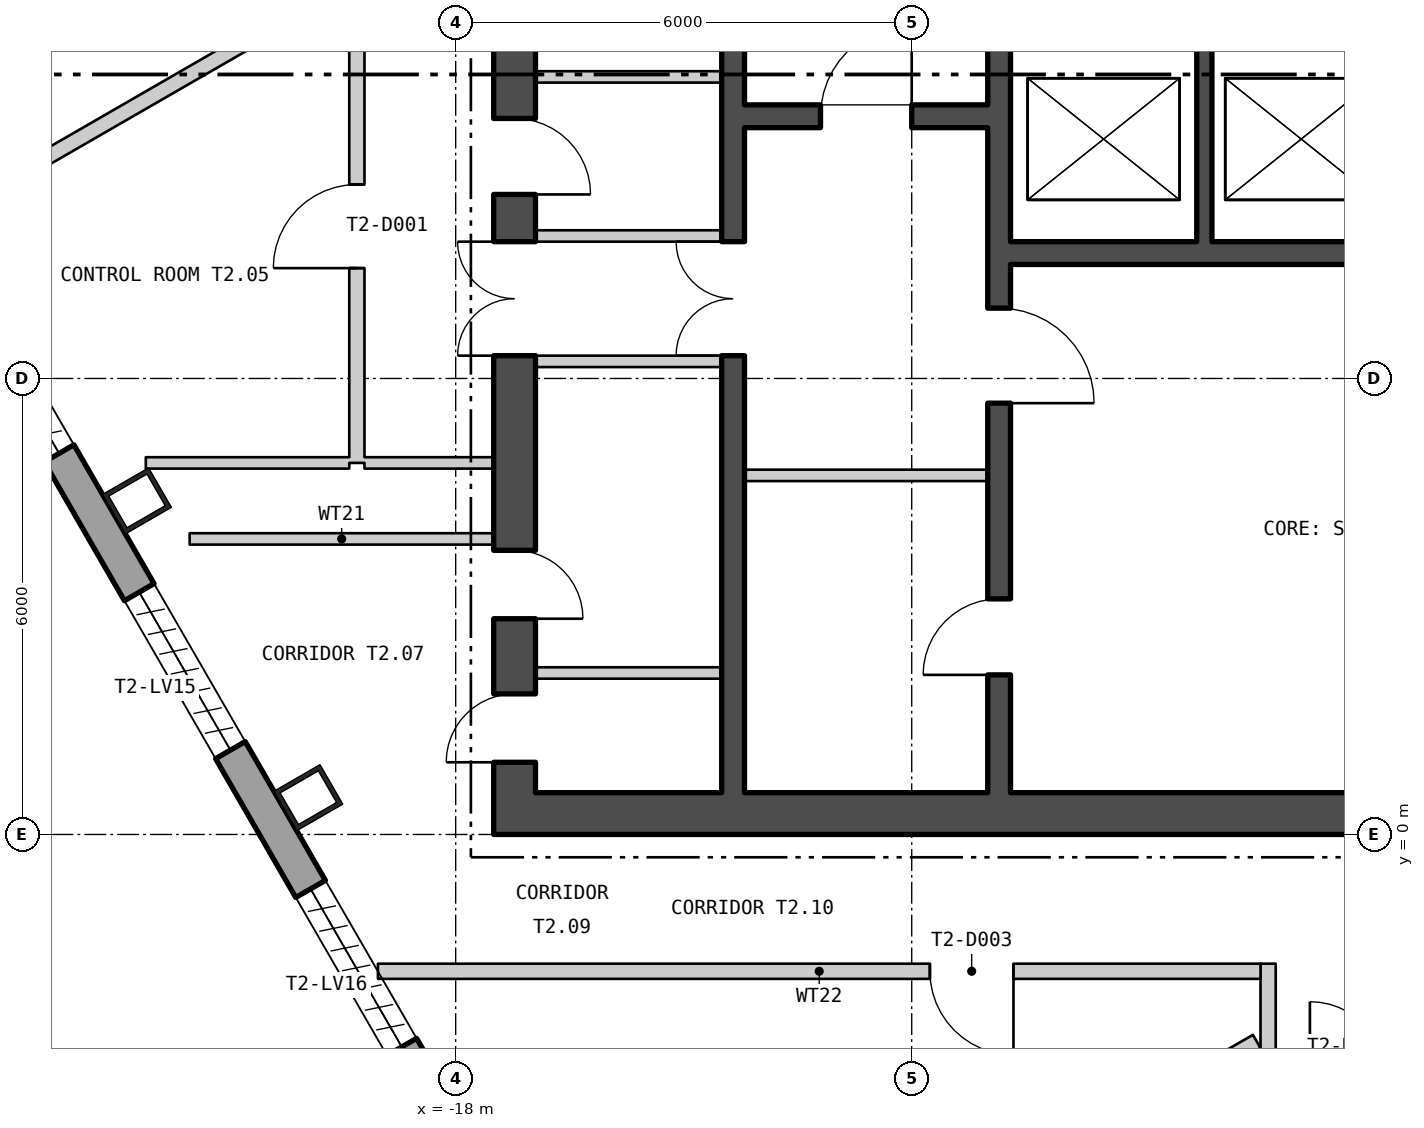
"""IFC4 building model, lengths in metres.
Left out: names, types, materials, properties, quantities, classifications, styles, units other than length and angle.
Written with IfcOpenShell. Run it as: python <this file> out.ifc"""

import sys

from ifc_helpers import new_model, si_unit, direction, frame, frame_2d, origin, origin_2d, place, context, subcontext, project, spatial, polyline, rectangle, hollow_rectangle, outline, extrude, element, fill, save


model = new_model("IFC4")
c1 = context("Model", 3, precision=1e-05, world=origin(), true_north=direction((0.0, 1.0)))
c2 = subcontext(c1, "Body", "Model", "MODEL_VIEW")
j1 = project(units=[si_unit("LENGTHUNIT", "METRE"), si_unit("PLANEANGLEUNIT", "RADIAN")], contexts=[c1])
p1 = place(None, origin())
s1 = spatial("IfcSite", under=j1, at=p1, CompositionType="ELEMENT")
p2 = place(p1, origin())
s2 = spatial("IfcBuilding", under=s1, at=p2, CompositionType="ELEMENT")
p3 = place(p2, frame((0.0, 0.0, 133.8)))
s3 = spatial("IfcBuildingStorey", under=s2, at=p3, CompositionType="ELEMENT", Elevation=133.8)
for number, where, z_axis, x_axis in (
    (1, (-22.193, 4.389, 0.0), (0.0, 0.0, 1.0), (0.5, -0.866, 0.0)),
    (2, (-19.938, 0.484, 0.0), (0.0, 0.0, 1.0), (0.5, -0.866, 0.0)),
):
    element("IfcColumn", number, at=place(p3, frame(where, z_axis=z_axis, x_axis=x_axis)), inside=s3, PredefinedType="COLUMN", context=c2, shape_type="SweptSolid", body=[
        extrude(hollow_rectangle(XDim=0.6, YDim=0.7, WallThickness=0.06, at=origin_2d()), origin(), (0.0, 0.0, 1.0), 6.0),
    ])
p4 = place(p3, frame((-27.365, 12.198, -0.18), z_axis=(0.0, 0.0, 1.0), x_axis=(0.500000335318, -0.866025210188, 0.0)))
e3 = element("IfcWall", 3, at=p4, inside=s3, PredefinedType="SOLIDWALL", context=c2, shape_type="SweptSolid", body=[
    extrude(outline(polyline([(-0.13, -0.225), (45.88, -0.225), (45.62, 0.225), (0.13, 0.225), (-0.13, -0.225)])), origin(), (0.0, 0.0, 1.0), 6.0),
])
p5 = place(p4, frame((1.425, 0.0, 1.38)))
e4 = element("IfcOpeningElement", 4, at=p5, cuts=e3, PredefinedType="OPENING", context=c2, shape_type="SweptSolid", body=[
    extrude(rectangle(XDim=2.4, YDim=3.6, at=frame_2d((1.2, 1.8))), frame((0.0, 0.235, 0.0), z_axis=(0.0, -1.0, 0.0), x_axis=(1.0, 0.0, 0.0)), (0.0, 0.0, 1.0), 0.47),
])
p6 = place(p4, frame((5.895, 0.0, 1.38)))
e5 = element("IfcOpeningElement", 5, at=p6, cuts=e3, PredefinedType="OPENING", context=c2, shape_type="SweptSolid", body=[
    extrude(rectangle(XDim=2.4, YDim=3.6, at=frame_2d((1.2, 1.8))), frame((0.0, 0.235, 0.0), z_axis=(0.0, -1.0, 0.0), x_axis=(1.0, 0.0, 0.0)), (0.0, 0.0, 1.0), 0.47),
])
p7 = place(p4, frame((10.403, 0.0, 1.38)))
e6 = element("IfcOpeningElement", 6, at=p7, cuts=e3, PredefinedType="OPENING", context=c2, shape_type="SweptSolid", body=[
    extrude(rectangle(XDim=2.4, YDim=3.6, at=frame_2d((1.2, 1.8))), frame((0.0, 0.235, 0.0), z_axis=(0.0, -1.0, 0.0), x_axis=(1.0, 0.0, 0.0)), (0.0, 0.0, 1.0), 0.47),
])
p8 = place(p4, frame((14.912, 0.0, 1.38)))
e7 = element("IfcOpeningElement", 7, at=p8, cuts=e3, PredefinedType="OPENING", context=c2, shape_type="SweptSolid", body=[
    extrude(rectangle(XDim=2.4, YDim=3.6, at=frame_2d((1.2, 1.8))), frame((0.0, 0.235, 0.0), z_axis=(0.0, -1.0, 0.0), x_axis=(1.0, 0.0, 0.0)), (0.0, 0.0, 1.0), 0.47),
])
p9 = place(p4, frame((19.421, 0.0, 1.38)))
e8 = element("IfcOpeningElement", 8, at=p9, cuts=e3, PredefinedType="OPENING", context=c2, shape_type="SweptSolid", body=[
    extrude(rectangle(XDim=2.4, YDim=3.6, at=frame_2d((1.2, 1.8))), frame((0.0, 0.235, 0.0), z_axis=(0.0, -1.0, 0.0), x_axis=(1.0, 0.0, 0.0)), (0.0, 0.0, 1.0), 0.47),
])
p10 = place(p4, frame((23.929, 0.0, 1.38)))
e9 = element("IfcOpeningElement", 9, at=p10, cuts=e3, PredefinedType="OPENING", context=c2, shape_type="SweptSolid", body=[
    extrude(rectangle(XDim=2.4, YDim=3.6, at=frame_2d((1.2, 1.8))), frame((0.0, 0.235, 0.0), z_axis=(0.0, -1.0, 0.0), x_axis=(1.0, 0.0, 0.0)), (0.0, 0.0, 1.0), 0.47),
])
p11 = place(p4, frame((28.438, 0.0, 1.38)))
e10 = element("IfcOpeningElement", 10, at=p11, cuts=e3, PredefinedType="OPENING", context=c2, shape_type="SweptSolid", body=[
    extrude(rectangle(XDim=2.4, YDim=3.6, at=frame_2d((1.2, 1.8))), frame((0.0, 0.235, 0.0), z_axis=(0.0, -1.0, 0.0), x_axis=(1.0, 0.0, 0.0)), (0.0, 0.0, 1.0), 0.47),
])
p12 = place(p4, frame((32.947, 0.0, 1.38)))
e11 = element("IfcOpeningElement", 11, at=p12, cuts=e3, PredefinedType="OPENING", context=c2, shape_type="SweptSolid", body=[
    extrude(rectangle(XDim=2.4, YDim=3.6, at=frame_2d((1.2, 1.8))), frame((0.0, 0.235, 0.0), z_axis=(0.0, -1.0, 0.0), x_axis=(1.0, 0.0, 0.0)), (0.0, 0.0, 1.0), 0.47),
])
p13 = place(p4, frame((37.455, 0.0, 1.38)))
e12 = element("IfcOpeningElement", 12, at=p13, cuts=e3, PredefinedType="OPENING", context=c2, shape_type="SweptSolid", body=[
    extrude(rectangle(XDim=2.4, YDim=3.6, at=frame_2d((1.2, 1.8))), frame((0.0, 0.235, 0.0), z_axis=(0.0, -1.0, 0.0), x_axis=(1.0, 0.0, 0.0)), (0.0, 0.0, 1.0), 0.47),
])
p14 = place(p4, frame((41.925, 0.0, 1.38)))
e13 = element("IfcOpeningElement", 13, at=p14, cuts=e3, PredefinedType="OPENING", context=c2, shape_type="SweptSolid", body=[
    extrude(rectangle(XDim=2.4, YDim=3.6, at=frame_2d((1.2, 1.8))), frame((0.0, 0.235, 0.0), z_axis=(0.0, -1.0, 0.0), x_axis=(1.0, 0.0, 0.0)), (0.0, 0.0, 1.0), 0.47),
])
p15 = place(p3, frame((-17.5, 0.275, 0.0), z_axis=(0.0, 0.0, 1.0), x_axis=(1.0, 0.0, 0.0)))
e14 = element("IfcWall", 14, at=p15, inside=s3, PredefinedType="SHEAR", context=c2, shape_type="SweptSolid", body=[
    extrude(rectangle(XDim=35.0, YDim=0.55, at=frame_2d((17.5, 0.0))), origin(), (0.0, 0.0, 1.0), 5.8),
])
p16 = place(p15, frame((12.0, 0.0, 0.0)))
e15 = element("IfcOpeningElement", 15, at=p16, cuts=e14, PredefinedType="OPENING", context=c2, shape_type="SweptSolid", body=[
    extrude(rectangle(XDim=1.8, YDim=2.4, at=frame_2d((0.9, 1.2))), frame((0.0, 0.285, 0.0), z_axis=(0.0, -1.0, 0.0), x_axis=(1.0, 0.0, 0.0)), (0.0, 0.0, 1.0), 0.57),
])
p17 = place(p15, frame((22.0, 0.0, 0.0)))
e16 = element("IfcOpeningElement", 16, at=p17, cuts=e14, PredefinedType="OPENING", context=c2, shape_type="SweptSolid", body=[
    extrude(rectangle(XDim=1.8, YDim=2.4, at=frame_2d((0.9, 1.2))), frame((0.0, 0.285, 0.0), z_axis=(0.0, -1.0, 0.0), x_axis=(1.0, 0.0, 0.0)), (0.0, 0.0, 1.0), 0.57),
])
p18 = place(p3, frame((-17.225, 0.55, 0.0), z_axis=(0.0, 0.0, 1.0), x_axis=(0.0, 1.0, 0.0)))
e17 = element("IfcWall", 17, at=p18, inside=s3, PredefinedType="SHEAR", context=c2, shape_type="SweptSolid", body=[
    extrude(rectangle(XDim=16.9, YDim=0.55, at=frame_2d((8.45, 0.0))), origin(), (0.0, 0.0, 1.0), 5.8),
])
p19 = place(p18, frame((5.75, 0.0, 0.0)))
e18 = element("IfcOpeningElement", 18, at=p19, cuts=e17, PredefinedType="OPENING", context=c2, shape_type="SweptSolid", body=[
    extrude(rectangle(XDim=1.5, YDim=2.1, at=frame_2d((0.75, 1.05))), frame((0.0, 0.285, 0.0), z_axis=(0.0, -1.0, 0.0), x_axis=(1.0, 0.0, 0.0)), (0.0, 0.0, 1.0), 0.57),
])
p20 = place(p18, frame((0.4, 0.0, 0.0)))
e19 = element("IfcOpeningElement", 19, at=p20, cuts=e17, PredefinedType="OPENING", context=c2, shape_type="SweptSolid", body=[
    extrude(rectangle(XDim=0.9, YDim=2.1, at=frame_2d((0.45, 1.05))), frame((0.0, 0.285, 0.0), z_axis=(0.0, -1.0, 0.0), x_axis=(1.0, 0.0, 0.0)), (0.0, 0.0, 1.0), 0.57),
])
p21 = place(p18, frame((2.289, 0.0, 0.0)))
e20 = element("IfcOpeningElement", 20, at=p21, cuts=e17, PredefinedType="OPENING", context=c2, shape_type="SweptSolid", body=[
    extrude(rectangle(XDim=0.9, YDim=2.1, at=frame_2d((0.45, 1.05))), frame((0.0, 0.285, 0.0), z_axis=(0.0, -1.0, 0.0), x_axis=(1.0, 0.0, 0.0)), (0.0, 0.0, 1.0), 0.57),
])
p22 = place(p18, frame((7.871, 0.0, 0.0)))
e21 = element("IfcOpeningElement", 21, at=p22, cuts=e17, PredefinedType="OPENING", context=c2, shape_type="SweptSolid", body=[
    extrude(rectangle(XDim=1.0, YDim=2.1, at=frame_2d((0.5, 1.05))), frame((0.0, 0.285, 0.0), z_axis=(0.0, -1.0, 0.0), x_axis=(1.0, 0.0, 0.0)), (0.0, 0.0, 1.0), 0.57),
])
p23 = place(p18, frame((12.746, 0.0, 0.0)))
e22 = element("IfcOpeningElement", 22, at=p23, cuts=e17, PredefinedType="OPENING", context=c2, shape_type="SweptSolid", body=[
    extrude(rectangle(XDim=0.9, YDim=2.1, at=frame_2d((0.45, 1.05))), frame((0.0, 0.285, 0.0), z_axis=(0.0, -1.0, 0.0), x_axis=(1.0, 0.0, 0.0)), (0.0, 0.0, 1.0), 0.57),
])
p24 = place(p3, frame((-10.85, 0.55, 0.0), z_axis=(0.0, 0.0, 1.0), x_axis=(0.0, 1.0, 0.0)))
e23 = element("IfcWall", 23, at=p24, inside=s3, PredefinedType="SHEAR", context=c2, shape_type="SweptSolid", body=[
    extrude(rectangle(XDim=16.9, YDim=0.3, at=frame_2d((8.45, 0.0))), origin(), (0.0, 0.0, 1.0), 5.8),
])
p25 = place(p24, frame((5.125, 0.0, 0.0)))
e24 = element("IfcOpeningElement", 24, at=p25, cuts=e23, PredefinedType="OPENING", context=c2, shape_type="SweptSolid", body=[
    extrude(rectangle(XDim=1.25, YDim=2.1, at=frame_2d((0.625, 1.05))), frame((0.0, 0.16, 0.0), z_axis=(0.0, -1.0, 0.0), x_axis=(1.0, 0.0, 0.0)), (0.0, 0.0, 1.0), 0.32),
])
p26 = place(p24, frame((1.55, 0.0, 0.0)))
e25 = element("IfcOpeningElement", 25, at=p26, cuts=e23, PredefinedType="OPENING", context=c2, shape_type="SweptSolid", body=[
    extrude(rectangle(XDim=1.0, YDim=2.1, at=frame_2d((0.5, 1.05))), frame((0.0, 0.16, 0.0), z_axis=(0.0, -1.0, 0.0), x_axis=(1.0, 0.0, 0.0)), (0.0, 0.0, 1.0), 0.32),
])
p27 = place(p3, frame((-14.35, 0.55, 0.0), z_axis=(0.0, 0.0, 1.0), x_axis=(0.0, 1.0, 0.0)))
e26 = element("IfcWall", 26, at=p27, inside=s3, PredefinedType="SHEAR", context=c2, shape_type="SweptSolid", body=[
    extrude(rectangle(XDim=16.9, YDim=0.3, at=frame_2d((8.45, 0.0))), origin(), (0.0, 0.0, 1.0), 5.8),
])
p28 = place(p27, frame((5.75, 0.0, 0.0)))
e27 = element("IfcOpeningElement", 27, at=p28, cuts=e26, PredefinedType="OPENING", context=c2, shape_type="SweptSolid", body=[
    extrude(rectangle(XDim=1.5, YDim=2.1, at=frame_2d((0.75, 1.05))), frame((0.0, 0.16, 0.0), z_axis=(0.0, -1.0, 0.0), x_axis=(1.0, 0.0, 0.0)), (0.0, 0.0, 1.0), 0.32),
])
p29 = place(p3, frame((-14.2, 9.45, 0.0), z_axis=(0.0, 0.0, 1.0), x_axis=(1.0, 0.0, 0.0)))
e28 = element("IfcWall", 28, at=p29, inside=s3, PredefinedType="SHEAR", context=c2, shape_type="SweptSolid", body=[
    extrude(rectangle(XDim=3.2, YDim=0.3, at=frame_2d((1.6, 0.0))), origin(), (0.0, 0.0, 1.0), 5.8),
])
p30 = place(p29, frame((1.0, 0.0, 0.0)))
e29 = element("IfcOpeningElement", 29, at=p30, cuts=e28, PredefinedType="OPENING", context=c2, shape_type="SweptSolid", body=[
    extrude(rectangle(XDim=1.2, YDim=2.1, at=frame_2d((0.6, 1.05))), frame((0.0, 0.16, 0.0), z_axis=(0.0, -1.0, 0.0), x_axis=(1.0, 0.0, 0.0)), (0.0, 0.0, 1.0), 0.32),
])
p31 = place(p3, frame((-10.7, 7.65, 0.0), z_axis=(0.0, 0.0, 1.0), x_axis=(1.0, 0.0, 0.0)))
e30 = element("IfcWall", 30, at=p31, inside=s3, PredefinedType="SHEAR", context=c2, shape_type="SweptSolid", body=[
    extrude(rectangle(XDim=10.3, YDim=0.3, at=frame_2d((5.15, 0.0))), origin(), (0.0, 0.0, 1.0), 5.8),
])
p32 = place(p3, frame((-8.15, 7.8, 0.0), z_axis=(0.0, 0.0, 1.0), x_axis=(0.0, 1.0, 0.0)))
e31 = element("IfcWall", 31, at=p32, inside=s3, PredefinedType="SHEAR", context=c2, shape_type="SweptSolid", body=[
    extrude(rectangle(XDim=2.7, YDim=0.2, at=frame_2d((1.35, 0.0))), origin(), (0.0, 0.0, 1.0), 5.8),
])
p33 = place(p3, frame((-14.2, 4.725, 0.0), z_axis=(0.0, 0.0, 1.0), x_axis=(1.0, 0.0, 0.0)))
e32 = element("IfcWall", 32, at=p33, inside=s3, PredefinedType="PARTITIONING", context=c2, shape_type="SweptSolid", body=[
    extrude(rectangle(XDim=3.2, YDim=0.15, at=frame_2d((1.6, 0.0))), origin(), (0.0, 0.0, 1.0), 5.8),
])
p34 = place(p3, frame((-16.95, 6.225, 0.0), z_axis=(0.0, 0.0, 1.0), x_axis=(1.0, 0.0, 0.0)))
e33 = element("IfcWall", 33, at=p34, inside=s3, PredefinedType="PARTITIONING", context=c2, shape_type="SweptSolid", body=[
    extrude(rectangle(XDim=2.45, YDim=0.15, at=frame_2d((1.225, 0.0))), origin(), (0.0, 0.0, 1.0), 5.8),
])
for number, where, z_axis, x_axis in (
    (34, (-16.95, 7.875, 0.0), (0.0, 0.0, 1.0), (1.0, 0.0, 0.0)),
    (35, (-16.95, 2.125, 0.0), (0.0, 0.0, 1.0), (1.0, 0.0, 0.0)),
):
    element("IfcWall", number, at=place(p3, frame(where, z_axis=z_axis, x_axis=x_axis)), inside=s3, PredefinedType="PARTITIONING", context=c2, shape_type="SweptSolid", body=[
        extrude(rectangle(XDim=2.45, YDim=0.15, at=frame_2d((1.225, 0.0))), origin(), (0.0, 0.0, 1.0), 5.5),
    ])
p35 = place(p3, frame((-16.95, 9.968, 0.0), z_axis=(0.0, 0.0, 1.0), x_axis=(1.0, 0.0, 0.0)))
e36 = element("IfcWall", 36, at=p35, inside=s3, PredefinedType="PARTITIONING", context=c2, shape_type="SweptSolid", body=[
    extrude(rectangle(XDim=2.45, YDim=0.15, at=frame_2d((1.225, 0.0))), origin(), (0.0, 0.0, 1.0), 5.8),
])
p36 = place(p3, frame((-24.361, 8.344, 0.0), z_axis=(0.0, 0.0, 1.0), x_axis=(0.866129793638, 0.499819147866, 0.0)))
e37 = element("IfcWall", 37, at=p36, inside=s3, PredefinedType="PARTITIONING", context=c2, shape_type="SweptSolid", body=[
    extrude(rectangle(XDim=5.67, YDim=0.2, at=frame_2d((2.835, 0.0))), origin(), (0.0, 0.0, 1.0), 5.8),
])
p37 = place(p3, frame((-22.077, 4.889, 0.0), z_axis=(0.0, 0.0, 1.0), x_axis=(1.0, 0.0, 0.0)))
e38 = element("IfcWall", 38, at=p37, inside=s3, PredefinedType="PARTITIONING", context=c2, shape_type="SweptSolid", body=[
    extrude(rectangle(XDim=2.677, YDim=0.15, at=frame_2d((1.339, 0.0))), origin(), (0.0, 0.0, 1.0), 5.8),
])
p38 = place(p3, frame((-21.5, 3.889, 0.0), z_axis=(0.0, 0.0, 1.0), x_axis=(1.0, 0.0, 0.0)))
e39 = element("IfcWall", 39, at=p38, inside=s3, PredefinedType="PARTITIONING", context=c2, shape_type="SweptSolid", body=[
    extrude(rectangle(XDim=4.0, YDim=0.15, at=frame_2d((2.0, 0.0))), origin(), (0.0, 0.0, 1.0), 5.8),
])
p39 = place(p3, frame((-19.3, 4.889, 0.0), z_axis=(0.0, 0.0, 1.0), x_axis=(0.0, 1.0, 0.0)))
e40 = element("IfcWall", 40, at=p39, inside=s3, PredefinedType="PARTITIONING", context=c2, shape_type="SweptSolid", body=[
    extrude(rectangle(XDim=14.861, YDim=0.2, at=frame_2d((7.431, 0.0))), origin(), (0.0, 0.0, 1.0), 5.8),
])
p40 = place(p39, frame((2.563, 0.0, 0.0)))
e41 = element("IfcOpeningElement", 41, at=p40, cuts=e40, PredefinedType="OPENING", context=c2, shape_type="SweptSolid", body=[
    extrude(rectangle(XDim=1.1, YDim=2.1, at=frame_2d((0.55, 1.05))), frame((0.0, 0.11, 0.0), z_axis=(0.0, -1.0, 0.0), x_axis=(1.0, 0.0, 0.0)), (0.0, 0.0, 1.0), 0.22),
])
p41 = place(p39, frame((9.941, 0.0, 0.0)))
e42 = element("IfcOpeningElement", 42, at=p41, cuts=e40, PredefinedType="OPENING", context=c2, shape_type="SweptSolid", body=[
    extrude(rectangle(XDim=1.1, YDim=2.1, at=frame_2d((0.55, 1.05))), frame((0.0, 0.11, 0.0), z_axis=(0.0, -1.0, 0.0), x_axis=(1.0, 0.0, 0.0)), (0.0, 0.0, 1.0), 0.22),
])
p42 = place(p3, frame((-19.2, 4.889, 0.0), z_axis=(0.0, 0.0, 1.0), x_axis=(1.0, 0.0, 0.0)))
e43 = element("IfcWall", 43, at=p42, inside=s3, PredefinedType="PARTITIONING", context=c2, shape_type="SweptSolid", body=[
    extrude(rectangle(XDim=1.7, YDim=0.15, at=frame_2d((0.85, 0.0))), origin(), (0.0, 0.0, 1.0), 5.8),
])
p43 = place(p3, frame((-19.023, -1.8, 0.0), z_axis=(0.0, 0.0, 1.0), x_axis=(1.0, 0.0, 0.0)))
e44 = element("IfcWall", 44, at=p43, inside=s3, PredefinedType="PARTITIONING", context=c2, shape_type="SweptSolid", body=[
    extrude(rectangle(XDim=11.612, YDim=0.2, at=frame_2d((5.806, 0.0))), origin(), (0.0, 0.0, 1.0), 5.8),
])
p44 = place(p43, frame((7.262, 0.0, 0.0)))
e45 = element("IfcOpeningElement", 45, at=p44, cuts=e44, PredefinedType="OPENING", context=c2, shape_type="SweptSolid", body=[
    extrude(rectangle(XDim=1.1, YDim=2.1, at=frame_2d((0.55, 1.05))), frame((0.0, 0.11, 0.0), z_axis=(0.0, -1.0, 0.0), x_axis=(1.0, 0.0, 0.0)), (0.0, 0.0, 1.0), 0.22),
])
p45 = place(p3, frame((-15.344, -7.274, 0.0), z_axis=(0.0, 0.0, 1.0), x_axis=(0.866037399706, 0.499979221878, 0.0)))
e46 = element("IfcWall", 46, at=p45, inside=s3, PredefinedType="PARTITIONING", context=c2, shape_type="SweptSolid", body=[
    extrude(rectangle(XDim=9.102, YDim=0.2, at=frame_2d((4.551, 0.0))), origin(), (0.0, 0.0, 1.0), 5.8),
])
p46 = place(p3, frame((-7.311, -3.2, 0.0), z_axis=(0.0, 0.0, 1.0), x_axis=(-6.6666667e-05, 0.999999997778, 0.0)))
e47 = element("IfcWall", 47, at=p46, inside=s3, PredefinedType="PARTITIONING", context=c2, shape_type="SweptSolid", body=[
    extrude(rectangle(XDim=1.5, YDim=0.2, at=frame_2d((0.75, 0.0))), origin(), (0.0, 0.0, 1.0), 5.8),
])
p47 = place(p30, origin())
e48 = element("IfcDoor", 48, at=p47, inside=s3, OperationType="SINGLE_SWING_LEFT", PredefinedType="DOOR", context=c2, shape_type="SweptSolid", body=[
    extrude(rectangle(XDim=1.2, YDim=2.1, at=frame_2d((0.6, 1.05))), frame((0.0, 0.025, 0.0), z_axis=(0.0, -1.0, 0.0), x_axis=(1.0, 0.0, 0.0)), (0.0, 0.0, 1.0), 0.05),
])
fill(e29, e48)
p48 = place(p25, origin())
e49 = element("IfcDoor", 49, at=p48, inside=s3, OperationType="SINGLE_SWING_LEFT", PredefinedType="DOOR", context=c2, shape_type="SweptSolid", body=[
    extrude(rectangle(XDim=1.25, YDim=2.1, at=frame_2d((0.625, 1.05))), frame((0.0, 0.025, 0.0), z_axis=(0.0, -1.0, 0.0), x_axis=(1.0, 0.0, 0.0)), (0.0, 0.0, 1.0), 0.05),
])
fill(e24, e49)
p49 = place(p26, origin())
e50 = element("IfcDoor", 50, at=p49, inside=s3, OperationType="SINGLE_SWING_RIGHT", PredefinedType="DOOR", context=c2, shape_type="SweptSolid", body=[
    extrude(rectangle(XDim=1.0, YDim=2.1, at=frame_2d((0.5, 1.05))), frame((0.0, 0.025, 0.0), z_axis=(0.0, -1.0, 0.0), x_axis=(1.0, 0.0, 0.0)), (0.0, 0.0, 1.0), 0.05),
])
fill(e25, e50)
p50 = place(p28, origin())
e51 = element("IfcDoor", 51, at=p50, inside=s3, OperationType="DOUBLE_DOOR_SINGLE_SWING", PredefinedType="DOOR", context=c2, shape_type="SweptSolid", body=[
    extrude(rectangle(XDim=1.5, YDim=2.1, at=frame_2d((0.75, 1.05))), frame((0.0, 0.025, 0.0), z_axis=(0.0, -1.0, 0.0), x_axis=(1.0, 0.0, 0.0)), (0.0, 0.0, 1.0), 0.05),
])
fill(e27, e51)
p51 = place(p19, origin())
e52 = element("IfcDoor", 52, at=p51, inside=s3, OperationType="DOUBLE_DOOR_SINGLE_SWING", PredefinedType="DOOR", context=c2, shape_type="SweptSolid", body=[
    extrude(rectangle(XDim=1.5, YDim=2.1, at=frame_2d((0.75, 1.05))), frame((0.0, 0.025, 0.0), z_axis=(0.0, -1.0, 0.0), x_axis=(1.0, 0.0, 0.0)), (0.0, 0.0, 1.0), 0.05),
])
fill(e18, e52)
p52 = place(p20, origin())
e53 = element("IfcDoor", 53, at=p52, inside=s3, OperationType="SINGLE_SWING_RIGHT", PredefinedType="DOOR", context=c2, shape_type="SweptSolid", body=[
    extrude(rectangle(XDim=0.9, YDim=2.1, at=frame_2d((0.45, 1.05))), frame((0.0, 0.025, 0.0), z_axis=(0.0, -1.0, 0.0), x_axis=(1.0, 0.0, 0.0)), (0.0, 0.0, 1.0), 0.05),
])
fill(e19, e53)
p53 = place(p21, origin())
e54 = element("IfcDoor", 54, at=p53, inside=s3, OperationType="SINGLE_SWING_LEFT", PredefinedType="DOOR", context=c2, shape_type="SweptSolid", body=[
    extrude(rectangle(XDim=0.9, YDim=2.1, at=frame_2d((0.45, 1.05))), frame((0.0, 0.025, 0.0), z_axis=(0.0, -1.0, 0.0), x_axis=(1.0, 0.0, 0.0)), (0.0, 0.0, 1.0), 0.05),
])
fill(e20, e54)
p54 = place(p22, origin())
e55 = element("IfcDoor", 55, at=p54, inside=s3, OperationType="SINGLE_SWING_LEFT", PredefinedType="DOOR", context=c2, shape_type="SweptSolid", body=[
    extrude(rectangle(XDim=1.0, YDim=2.1, at=frame_2d((0.5, 1.05))), frame((0.0, 0.025, 0.0), z_axis=(0.0, -1.0, 0.0), x_axis=(1.0, 0.0, 0.0)), (0.0, 0.0, 1.0), 0.05),
])
fill(e21, e55)
p55 = place(p40, origin())
e56 = element("IfcDoor", 56, at=p55, inside=s3, OperationType="SINGLE_SWING_RIGHT", PredefinedType="DOOR", context=c2, shape_type="SweptSolid", body=[
    extrude(rectangle(XDim=1.1, YDim=2.1, at=frame_2d((0.55, 1.05))), frame((0.0, 0.025, 0.0), z_axis=(0.0, -1.0, 0.0), x_axis=(1.0, 0.0, 0.0)), (0.0, 0.0, 1.0), 0.05),
])
fill(e41, e56)
p56 = place(p44, origin())
e57 = element("IfcDoor", 57, at=p56, inside=s3, OperationType="SINGLE_SWING_RIGHT", PredefinedType="DOOR", context=c2, shape_type="SweptSolid", body=[
    extrude(rectangle(XDim=1.1, YDim=2.1, at=frame_2d((0.55, 1.05))), frame((0.0, 0.025, 0.0), z_axis=(0.0, -1.0, 0.0), x_axis=(1.0, 0.0, 0.0)), (0.0, 0.0, 1.0), 0.05),
])
fill(e45, e57)
save(model, sys.argv[1])
